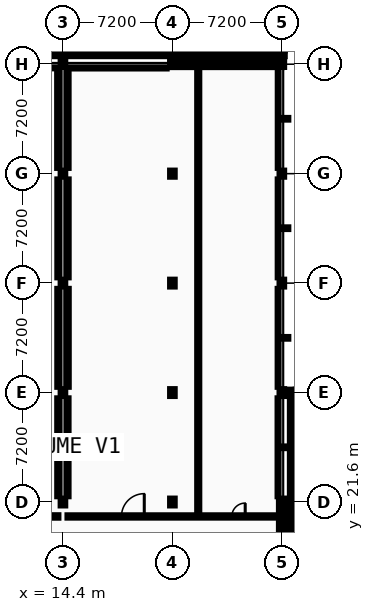
"""IFC4 building model, lengths in metres.
Left out: names, types, materials, properties, quantities, classifications, styles, units other than length and angle.
Written with IfcOpenShell. Run it as: python <this file> out.ifc"""

import sys

from ifc_helpers import new_model, si_unit, direction, frame, frame_2d, origin, origin_2d, place, context, subcontext, project, spatial, rectangle, i_section, extrude, element, fill, save


model = new_model("IFC4")
c1 = context("Model", 3, precision=1e-05, world=origin(), true_north=direction((0.0, 1.0)))
c2 = subcontext(c1, "Body", "Model", "MODEL_VIEW")
j1 = project(units=[si_unit("LENGTHUNIT", "METRE"), si_unit("PLANEANGLEUNIT", "RADIAN")], contexts=[c1])
p1 = place(None, origin())
s1 = spatial("IfcSite", under=j1, at=p1, CompositionType="ELEMENT")
p2 = place(p1, origin())
s2 = spatial("IfcBuilding", under=s1, at=p2, CompositionType="ELEMENT")
p3 = place(p2, frame((0.0, 0.0, 9.6)))
s3 = spatial("IfcBuildingStorey", under=s2, at=p3, CompositionType="ELEMENT", Elevation=9.6)
for number, where, z_axis, x_axis in (
    (1, (14.4, 21.6, 0.0), (0.0, 0.0, 1.0), (1.0, 0.0, 0.0)),
    (2, (14.4, 28.8, 0.0), (0.0, 0.0, 1.0), (1.0, 0.0, 0.0)),
    (3, (14.4, 36.0, 0.0), (0.0, 0.0, 1.0), (1.0, 0.0, 0.0)),
):
    element("IfcColumn", number, at=place(p3, frame(where, z_axis=z_axis, x_axis=x_axis)), inside=s3, PredefinedType="COLUMN", context=c2, shape_type="SweptSolid", body=[
        extrude(i_section(OverallWidth=0.3, OverallDepth=0.45, WebThickness=0.014, FlangeThickness=0.026, FilletRadius=0.027, at=origin_2d()), origin(), (0.0, 0.0, 1.0), 4.4),
    ])
p4 = place(p3, frame((14.4, 43.2, 0.0), z_axis=(0.0, 0.0, 1.0), x_axis=(1.0, 0.0, 0.0)))
e4 = element("IfcColumn", 4, at=p4, inside=s3, PredefinedType="COLUMN", context=c2, shape_type="SweptSolid", body=[
    extrude(i_section(OverallWidth=0.3, OverallDepth=0.4, WebThickness=0.013, FlangeThickness=0.024, FilletRadius=0.027, at=origin_2d()), origin(), (0.0, 0.0, 1.0), 4.4),
])
p5 = place(p3, frame((14.4, 50.4, 0.0), z_axis=(0.0, 0.0, 1.0), x_axis=(1.0, 0.0, 0.0)))
e5 = element("IfcColumn", 5, at=p5, inside=s3, PredefinedType="COLUMN", context=c2, shape_type="SweptSolid", body=[
    extrude(i_section(OverallWidth=0.3, OverallDepth=0.36, WebThickness=0.012, FlangeThickness=0.022, FilletRadius=0.027, at=origin_2d()), origin(), (0.0, 0.0, 1.0), 4.4),
])
p6 = place(p3, frame((14.4, 51.12, 0.0), z_axis=(0.0, 0.0, 1.0), x_axis=(1.0, 0.0, 0.0)))
e6 = element("IfcColumn", 6, at=p6, inside=s3, PredefinedType="COLUMN", context=c2, shape_type="SweptSolid", body=[
    extrude(i_section(OverallWidth=0.24, OverallDepth=0.24, WebThickness=0.01, FlangeThickness=0.017, FilletRadius=0.021, at=origin_2d()), origin(), (0.0, 0.0, 1.0), 4.4),
])
for number, where, z_axis, x_axis in (
    (7, (21.6, 21.6, 0.0), (0.0, 0.0, 1.0), (1.0, 0.0, 0.0)),
    (8, (21.6, 28.8, 0.0), (0.0, 0.0, 1.0), (1.0, 0.0, 0.0)),
    (9, (21.6, 36.0, 0.0), (0.0, 0.0, 1.0), (1.0, 0.0, 0.0)),
):
    element("IfcColumn", number, at=place(p3, frame(where, z_axis=z_axis, x_axis=x_axis)), inside=s3, PredefinedType="COLUMN", context=c2, shape_type="SweptSolid", body=[
        extrude(i_section(OverallWidth=0.3, OverallDepth=0.45, WebThickness=0.014, FlangeThickness=0.026, FilletRadius=0.027, at=origin_2d()), origin(), (0.0, 0.0, 1.0), 4.4),
    ])
p7 = place(p3, frame((21.6, 43.2, 0.0), z_axis=(0.0, 0.0, 1.0), x_axis=(1.0, 0.0, 0.0)))
e10 = element("IfcColumn", 10, at=p7, inside=s3, PredefinedType="COLUMN", context=c2, shape_type="SweptSolid", body=[
    extrude(i_section(OverallWidth=0.3, OverallDepth=0.4, WebThickness=0.013, FlangeThickness=0.024, FilletRadius=0.027, at=origin_2d()), origin(), (0.0, 0.0, 1.0), 4.4),
])
p8 = place(p3, frame((21.6, 50.4, 0.0), z_axis=(0.0, 0.0, 1.0), x_axis=(1.0, 0.0, 0.0)))
e11 = element("IfcColumn", 11, at=p8, inside=s3, PredefinedType="COLUMN", context=c2, shape_type="SweptSolid", body=[
    extrude(i_section(OverallWidth=0.3, OverallDepth=0.36, WebThickness=0.012, FlangeThickness=0.022, FilletRadius=0.027, at=origin_2d()), origin(), (0.0, 0.0, 1.0), 4.4),
])
p9 = place(p3, frame((21.6, 51.12, 0.0), z_axis=(0.0, 0.0, 1.0), x_axis=(1.0, 0.0, 0.0)))
e12 = element("IfcColumn", 12, at=p9, inside=s3, PredefinedType="COLUMN", context=c2, shape_type="SweptSolid", body=[
    extrude(i_section(OverallWidth=0.24, OverallDepth=0.24, WebThickness=0.01, FlangeThickness=0.017, FilletRadius=0.021, at=origin_2d()), origin(), (0.0, 0.0, 1.0), 4.4),
])
for number, where, z_axis, x_axis in (
    (13, (28.8, 21.6, 0.0), (0.0, 0.0, 1.0), (1.0, 0.0, 0.0)),
    (14, (28.8, 28.8, 0.0), (0.0, 0.0, 1.0), (1.0, 0.0, 0.0)),
    (15, (28.8, 36.0, 0.0), (0.0, 0.0, 1.0), (1.0, 0.0, 0.0)),
):
    element("IfcColumn", number, at=place(p3, frame(where, z_axis=z_axis, x_axis=x_axis)), inside=s3, PredefinedType="COLUMN", context=c2, shape_type="SweptSolid", body=[
        extrude(i_section(OverallWidth=0.3, OverallDepth=0.45, WebThickness=0.014, FlangeThickness=0.026, FilletRadius=0.027, at=origin_2d()), origin(), (0.0, 0.0, 1.0), 4.4),
    ])
p10 = place(p3, frame((28.8, 43.2, 0.0), z_axis=(0.0, 0.0, 1.0), x_axis=(1.0, 0.0, 0.0)))
e16 = element("IfcColumn", 16, at=p10, inside=s3, PredefinedType="COLUMN", context=c2, shape_type="SweptSolid", body=[
    extrude(i_section(OverallWidth=0.3, OverallDepth=0.4, WebThickness=0.013, FlangeThickness=0.024, FilletRadius=0.027, at=origin_2d()), origin(), (0.0, 0.0, 1.0), 4.4),
])
p11 = place(p3, frame((28.8, 50.4, 0.0), z_axis=(0.0, 0.0, 1.0), x_axis=(1.0, 0.0, 0.0)))
e17 = element("IfcColumn", 17, at=p11, inside=s3, PredefinedType="COLUMN", context=c2, shape_type="SweptSolid", body=[
    extrude(i_section(OverallWidth=0.3, OverallDepth=0.36, WebThickness=0.012, FlangeThickness=0.022, FilletRadius=0.027, at=origin_2d()), origin(), (0.0, 0.0, 1.0), 4.4),
])
p12 = place(p3, frame((28.8, 51.12, 0.0), z_axis=(0.0, 0.0, 1.0), x_axis=(1.0, 0.0, 0.0)))
e18 = element("IfcColumn", 18, at=p12, inside=s3, PredefinedType="COLUMN", context=c2, shape_type="SweptSolid", body=[
    extrude(i_section(OverallWidth=0.24, OverallDepth=0.24, WebThickness=0.01, FlangeThickness=0.017, FilletRadius=0.021, at=origin_2d()), origin(), (0.0, 0.0, 1.0), 4.4),
])
p13 = place(p3, frame((29.52, 21.6, 0.0), z_axis=(0.0, 0.0, 1.0), x_axis=(1.0, 0.0, 0.0)))
e19 = element("IfcColumn", 19, at=p13, inside=s3, PredefinedType="COLUMN", context=c2, shape_type="SweptSolid", body=[
    extrude(i_section(OverallWidth=0.3, OverallDepth=0.36, WebThickness=0.012, FlangeThickness=0.022, FilletRadius=0.027, at=origin_2d()), origin(), (0.0, 0.0, 1.0), 4.4),
])
p14 = place(p3, frame((29.52, 28.8, 0.0), z_axis=(0.0, 0.0, 1.0), x_axis=(1.0, 0.0, 0.0)))
e20 = element("IfcColumn", 20, at=p14, inside=s3, PredefinedType="COLUMN", context=c2, shape_type="SweptSolid", body=[
    extrude(i_section(OverallWidth=0.24, OverallDepth=0.24, WebThickness=0.01, FlangeThickness=0.017, FilletRadius=0.021, at=origin_2d()), origin(), (0.0, 0.0, 1.0), 4.4),
])
p15 = place(p3, frame((28.8, 50.4, 0.0), z_axis=(0.0, 0.0, 1.0), x_axis=(-1.0, 0.0, 0.0)))
e21 = element("IfcWall", 21, at=p15, inside=s3, PredefinedType="STANDARD", context=c2, shape_type="SweptSolid", body=[
    extrude(rectangle(XDim=7.31, YDim=0.38, at=frame_2d((3.655, 0.0))), origin(), (0.0, 0.0, 1.0), 3.895),
])
p16 = place(p15, frame((1.576, 0.0, 0.95)))
e22 = element("IfcOpeningElement", 22, at=p16, cuts=e21, PredefinedType="OPENING", context=c2, shape_type="SweptSolid", body=[
    extrude(rectangle(XDim=1.234, YDim=1.296, at=frame_2d((0.617, 0.648))), frame((0.0, 0.2, 0.0), z_axis=(0.0, -1.0, 0.0), x_axis=(1.0, 0.0, 0.0)), (0.0, 0.0, 1.0), 0.4),
])
p17 = place(p3, frame((28.8, 14.45, 0.0), z_axis=(0.0, 0.0, 1.0), x_axis=(0.0, 1.0, 0.0)))
e23 = element("IfcWall", 23, at=p17, inside=s3, PredefinedType="STANDARD", context=c2, shape_type="SweptSolid", body=[
    extrude(rectangle(XDim=7.15, YDim=0.38, at=frame_2d((3.575, 0.0))), origin(), (0.0, 0.0, 1.0), 4.2),
])
p18 = place(p17, frame((1.613, 0.0, 0.95)))
e24 = element("IfcOpeningElement", 24, at=p18, cuts=e23, PredefinedType="OPENING", context=c2, shape_type="SweptSolid", body=[
    extrude(rectangle(XDim=1.064, YDim=1.332, at=frame_2d((0.532, 0.666))), frame((0.0, 0.2, 0.0), z_axis=(0.0, -1.0, 0.0), x_axis=(1.0, 0.0, 0.0)), (0.0, 0.0, 1.0), 0.4),
])
p19 = place(p17, frame((4.473, 0.0, 0.95)))
e25 = element("IfcOpeningElement", 25, at=p19, cuts=e23, PredefinedType="OPENING", context=c2, shape_type="SweptSolid", body=[
    extrude(rectangle(XDim=1.064, YDim=1.332, at=frame_2d((0.532, 0.666))), frame((0.0, 0.2, 0.0), z_axis=(0.0, -1.0, 0.0), x_axis=(1.0, 0.0, 0.0)), (0.0, 0.0, 1.0), 0.4),
])
p20 = place(p3, frame((29.52, 21.6, 0.0), z_axis=(0.0, 0.0, 1.0), x_axis=(0.0, -1.0, 0.0)))
e26 = element("IfcWall", 26, at=p20, inside=s3, PredefinedType="STANDARD", context=c2, shape_type="SweptSolid", body=[
    extrude(rectangle(XDim=7.2, YDim=0.38, at=frame_2d((3.6, 0.0))), origin(), (0.0, 0.0, 1.0), 3.895),
])
p21 = place(p20, frame((1.662, 0.0, 0.95)))
e27 = element("IfcOpeningElement", 27, at=p21, cuts=e26, PredefinedType="OPENING", context=c2, shape_type="SweptSolid", body=[
    extrude(rectangle(XDim=0.996, YDim=1.368, at=frame_2d((0.498, 0.684))), frame((0.0, 0.2, 0.0), z_axis=(0.0, -1.0, 0.0), x_axis=(1.0, 0.0, 0.0)), (0.0, 0.0, 1.0), 0.4),
])
p22 = place(p20, frame((4.542, 0.0, 0.95)))
e28 = element("IfcOpeningElement", 28, at=p22, cuts=e26, PredefinedType="OPENING", context=c2, shape_type="SweptSolid", body=[
    extrude(rectangle(XDim=0.996, YDim=1.368, at=frame_2d((0.498, 0.684))), frame((0.0, 0.2, 0.0), z_axis=(0.0, -1.0, 0.0), x_axis=(1.0, 0.0, 0.0)), (0.0, 0.0, 1.0), 0.4),
])
p23 = place(p3, frame((29.52, 28.99, 0.0), z_axis=(0.0, 0.0, 1.0), x_axis=(0.0, -1.0, 0.0)))
e29 = element("IfcWall", 29, at=p23, inside=s3, PredefinedType="STANDARD", context=c2, shape_type="SweptSolid", body=[
    extrude(rectangle(XDim=7.39, YDim=0.38, at=frame_2d((3.695, 0.0))), origin(), (0.0, 0.0, 1.0), 3.9),
])
p24 = place(p23, frame((1.702, 0.0, 0.95)))
e30 = element("IfcOpeningElement", 30, at=p24, cuts=e29, PredefinedType="OPENING", context=c2, shape_type="SweptSolid", body=[
    extrude(rectangle(XDim=1.03, YDim=1.368, at=frame_2d((0.515, 0.684))), frame((0.0, 0.2, 0.0), z_axis=(0.0, -1.0, 0.0), x_axis=(1.0, 0.0, 0.0)), (0.0, 0.0, 1.0), 0.4),
])
p25 = place(p23, frame((4.658, 0.0, 0.95)))
e31 = element("IfcOpeningElement", 31, at=p25, cuts=e29, PredefinedType="OPENING", context=c2, shape_type="SweptSolid", body=[
    extrude(rectangle(XDim=1.03, YDim=1.368, at=frame_2d((0.515, 0.684))), frame((0.0, 0.2, 0.0), z_axis=(0.0, -1.0, 0.0), x_axis=(1.0, 0.0, 0.0)), (0.0, 0.0, 1.0), 0.4),
])
p26 = place(p3, frame((7.2, 51.12, 0.0), z_axis=(0.0, 0.0, 1.0), x_axis=(1.0, 0.0, 0.0)))
e32 = element("IfcWall", 32, at=p26, inside=s3, PredefinedType="STANDARD", context=c2, shape_type="SweptSolid", body=[
    extrude(rectangle(XDim=7.2, YDim=0.38, at=frame_2d((3.6, 0.0))), origin(), (0.0, 0.0, 1.0), 3.875),
])
p27 = place(p26, frame((4.474, 0.0, 0.95)))
e33 = element("IfcOpeningElement", 33, at=p27, cuts=e32, PredefinedType="OPENING", context=c2, shape_type="SweptSolid", body=[
    extrude(rectangle(XDim=1.132, YDim=1.26, at=frame_2d((0.566, 0.63))), frame((0.0, 0.2, 0.0), z_axis=(0.0, -1.0, 0.0), x_axis=(1.0, 0.0, 0.0)), (0.0, 0.0, 1.0), 0.4),
])
p28 = place(p3, frame((14.4, 51.12, 0.0), z_axis=(0.0, 0.0, 1.0), x_axis=(1.0, 0.0, 0.0)))
e34 = element("IfcWall", 34, at=p28, inside=s3, PredefinedType="STANDARD", context=c2, shape_type="SweptSolid", body=[
    extrude(rectangle(XDim=7.2, YDim=0.38, at=frame_2d((3.6, 0.0))), origin(), (0.0, 0.0, 1.0), 3.875),
])
p29 = place(p28, frame((1.577, 0.0, 0.95)))
e35 = element("IfcOpeningElement", 35, at=p29, cuts=e34, PredefinedType="OPENING", context=c2, shape_type="SweptSolid", body=[
    extrude(rectangle(XDim=1.166, YDim=1.26, at=frame_2d((0.583, 0.63))), frame((0.0, 0.2, 0.0), z_axis=(0.0, -1.0, 0.0), x_axis=(1.0, 0.0, 0.0)), (0.0, 0.0, 1.0), 0.4),
])
p30 = place(p3, frame((21.6, 51.12, 0.0), z_axis=(0.0, 0.0, 1.0), x_axis=(1.0, 0.0, 0.0)))
e36 = element("IfcWall", 36, at=p30, inside=s3, PredefinedType="STANDARD", context=c2, shape_type="SweptSolid", body=[
    extrude(rectangle(XDim=7.39, YDim=0.38, at=frame_2d((3.695, 0.0))), origin(), (0.0, 0.0, 1.0), 3.875),
])
p31 = place(p30, frame((1.617, 0.0, 0.95)))
e37 = element("IfcOpeningElement", 37, at=p31, cuts=e36, PredefinedType="OPENING", context=c2, shape_type="SweptSolid", body=[
    extrude(rectangle(XDim=1.2, YDim=1.26, at=frame_2d((0.6, 0.63))), frame((0.0, 0.2, 0.0), z_axis=(0.0, -1.0, 0.0), x_axis=(1.0, 0.0, 0.0)), (0.0, 0.0, 1.0), 0.4),
])
p32 = place(p30, frame((4.573, 0.0, 0.95)))
e38 = element("IfcOpeningElement", 38, at=p32, cuts=e36, PredefinedType="OPENING", context=c2, shape_type="SweptSolid", body=[
    extrude(rectangle(XDim=1.2, YDim=1.26, at=frame_2d((0.6, 0.63))), frame((0.0, 0.2, 0.0), z_axis=(0.0, -1.0, 0.0), x_axis=(1.0, 0.0, 0.0)), (0.0, 0.0, 1.0), 0.4),
])
p33 = place(p3, frame((0.2, 20.65, 0.0), z_axis=(0.0, 0.0, 1.0), x_axis=(1.0, 0.0, 0.0)))
e39 = element("IfcWall", 39, at=p33, inside=s3, PredefinedType="PARTITIONING", context=c2, shape_type="SweptSolid", body=[
    extrude(rectangle(XDim=13.9, YDim=0.16, at=frame_2d((6.95, 0.0))), origin(), (0.0, 0.0, 1.0), 4.2),
])
p34 = place(p33, frame((2.025, 0.0, 0.0)))
e40 = element("IfcOpeningElement", 40, at=p34, cuts=e39, PredefinedType="OPENING", context=c2, shape_type="SweptSolid", body=[
    extrude(rectangle(XDim=1.5, YDim=2.2, at=frame_2d((0.75, 1.1))), frame((0.0, 0.09, 0.0), z_axis=(0.0, -1.0, 0.0), x_axis=(1.0, 0.0, 0.0)), (0.0, 0.0, 1.0), 0.18),
])
p35 = place(p33, frame((9.272, 0.0, 0.0)))
e41 = element("IfcOpeningElement", 41, at=p35, cuts=e39, PredefinedType="OPENING", context=c2, shape_type="SweptSolid", body=[
    extrude(rectangle(XDim=0.906, YDim=2.152, at=frame_2d((0.453, 1.076))), frame((0.0, 0.09, 0.0), z_axis=(0.0, -1.0, 0.0), x_axis=(1.0, 0.0, 0.0)), (0.0, 0.0, 1.0), 0.18),
])
p36 = place(p3, frame((14.7, 20.65, 0.0), z_axis=(0.0, 0.0, 1.0), x_axis=(1.0, 0.0, 0.0)))
e42 = element("IfcWall", 42, at=p36, inside=s3, PredefinedType="PARTITIONING", context=c2, shape_type="SweptSolid", body=[
    extrude(rectangle(XDim=13.9, YDim=0.15, at=frame_2d((6.95, 0.0))), origin(), (0.0, 0.0, 1.0), 4.2),
])
p37 = place(p36, frame((10.81, 0.0, 0.0)))
e43 = element("IfcOpeningElement", 43, at=p37, cuts=e42, PredefinedType="OPENING", context=c2, shape_type="SweptSolid", body=[
    extrude(rectangle(XDim=0.88, YDim=2.152, at=frame_2d((0.44, 1.076))), frame((0.0, 0.085, 0.0), z_axis=(0.0, -1.0, 0.0), x_axis=(1.0, 0.0, 0.0)), (0.0, 0.0, 1.0), 0.17),
])
p38 = place(p36, frame((3.55, 0.0, 0.0)))
e44 = element("IfcOpeningElement", 44, at=p38, cuts=e42, PredefinedType="OPENING", context=c2, shape_type="SweptSolid", body=[
    extrude(rectangle(XDim=1.5, YDim=2.2, at=frame_2d((0.75, 1.1))), frame((0.0, 0.085, 0.0), z_axis=(0.0, -1.0, 0.0), x_axis=(1.0, 0.0, 0.0)), (0.0, 0.0, 1.0), 0.17),
])
p39 = place(p3, frame((7.58, 50.2, 0.0), z_axis=(0.0, 0.0, 1.0), x_axis=(1.0, 0.0, 0.0)))
e45 = element("IfcWall", 45, at=p39, inside=s3, PredefinedType="PARTITIONING", context=c2, shape_type="SweptSolid", body=[
    extrude(rectangle(XDim=6.44, YDim=0.142, at=frame_2d((3.22, 0.0))), origin(), (0.0, 0.0, 1.0), 3.895),
])
p40 = place(p3, frame((14.78, 50.2, 0.0), z_axis=(0.0, 0.0, 1.0), x_axis=(1.0, 0.0, 0.0)))
e46 = element("IfcWall", 46, at=p40, inside=s3, PredefinedType="PARTITIONING", context=c2, shape_type="SweptSolid", body=[
    extrude(rectangle(XDim=6.44, YDim=0.16, at=frame_2d((3.22, 0.0))), origin(), (0.0, 0.0, 1.0), 3.895),
])
p41 = place(p3, frame((14.1, 21.98, 0.0), z_axis=(0.0, 0.0, 1.0), x_axis=(0.0, 1.0, 0.0)))
e47 = element("IfcWall", 47, at=p41, inside=s3, PredefinedType="PARTITIONING", context=c2, shape_type="SweptSolid", body=[
    extrude(rectangle(XDim=6.44, YDim=0.15, at=frame_2d((3.22, 0.0))), origin(), (0.0, 0.0, 1.0), 3.895),
])
p42 = place(p3, frame((14.1, 29.18, 0.0), z_axis=(0.0, 0.0, 1.0), x_axis=(0.0, 1.0, 0.0)))
e48 = element("IfcWall", 48, at=p42, inside=s3, PredefinedType="PARTITIONING", context=c2, shape_type="SweptSolid", body=[
    extrude(rectangle(XDim=6.44, YDim=0.142, at=frame_2d((3.22, 0.0))), origin(), (0.0, 0.0, 1.0), 3.895),
])
p43 = place(p3, frame((14.1, 36.38, 0.0), z_axis=(0.0, 0.0, 1.0), x_axis=(0.0, 1.0, 0.0)))
e49 = element("IfcWall", 49, at=p43, inside=s3, PredefinedType="PARTITIONING", context=c2, shape_type="SweptSolid", body=[
    extrude(rectangle(XDim=6.44, YDim=0.135, at=frame_2d((3.22, 0.0))), origin(), (0.0, 0.0, 1.0), 4.2),
])
p44 = place(p3, frame((14.1, 43.58, 0.0), z_axis=(0.0, 0.0, 1.0), x_axis=(0.0, 1.0, 0.0)))
e50 = element("IfcWall", 50, at=p44, inside=s3, PredefinedType="PARTITIONING", context=c2, shape_type="SweptSolid", body=[
    extrude(rectangle(XDim=6.44, YDim=0.16, at=frame_2d((3.22, 0.0))), origin(), (0.0, 0.0, 1.0), 3.895),
])
p45 = place(p3, frame((14.7, 21.98, 0.0), z_axis=(0.0, 0.0, 1.0), x_axis=(0.0, 1.0, 0.0)))
e51 = element("IfcWall", 51, at=p45, inside=s3, PredefinedType="PARTITIONING", context=c2, shape_type="SweptSolid", body=[
    extrude(rectangle(XDim=6.44, YDim=0.135, at=frame_2d((3.22, 0.0))), origin(), (0.0, 0.0, 1.0), 4.2),
])
p46 = place(p3, frame((14.7, 29.18, 0.0), z_axis=(0.0, 0.0, 1.0), x_axis=(0.0, 1.0, 0.0)))
e52 = element("IfcWall", 52, at=p46, inside=s3, PredefinedType="PARTITIONING", context=c2, shape_type="SweptSolid", body=[
    extrude(rectangle(XDim=6.44, YDim=0.16, at=frame_2d((3.22, 0.0))), origin(), (0.0, 0.0, 1.0), 3.895),
])
p47 = place(p3, frame((14.7, 36.38, 0.0), z_axis=(0.0, 0.0, 1.0), x_axis=(0.0, 1.0, 0.0)))
e53 = element("IfcWall", 53, at=p47, inside=s3, PredefinedType="PARTITIONING", context=c2, shape_type="SweptSolid", body=[
    extrude(rectangle(XDim=6.44, YDim=0.15, at=frame_2d((3.22, 0.0))), origin(), (0.0, 0.0, 1.0), 3.895),
])
p48 = place(p3, frame((14.7, 43.58, 0.0), z_axis=(0.0, 0.0, 1.0), x_axis=(0.0, 1.0, 0.0)))
e54 = element("IfcWall", 54, at=p48, inside=s3, PredefinedType="PARTITIONING", context=c2, shape_type="SweptSolid", body=[
    extrude(rectangle(XDim=6.44, YDim=0.142, at=frame_2d((3.22, 0.0))), origin(), (0.0, 0.0, 1.0), 3.895),
])
p49 = place(p3, frame((23.3, 20.725, 0.0), z_axis=(0.0, 0.0, 1.0), x_axis=(0.0, 1.0, 0.0)))
e55 = element("IfcWall", 55, at=p49, inside=s3, PredefinedType="PARTITIONING", context=c2, shape_type="SweptSolid", body=[
    extrude(rectangle(XDim=29.475, YDim=0.135, at=frame_2d((14.737, 0.0))), origin(), (0.0, 0.0, 1.0), 4.2),
])
p50 = place(p3, frame((28.6, 21.98, 0.0), z_axis=(0.0, 0.0, 1.0), x_axis=(0.0, 1.0, 0.0)))
e56 = element("IfcWall", 56, at=p50, inside=s3, PredefinedType="PARTITIONING", context=c2, shape_type="SweptSolid", body=[
    extrude(rectangle(XDim=6.44, YDim=0.16, at=frame_2d((3.22, 0.0))), origin(), (0.0, 0.0, 1.0), 3.895),
])
p51 = place(p3, frame((28.6, 29.18, 0.0), z_axis=(0.0, 0.0, 1.0), x_axis=(0.0, 1.0, 0.0)))
e57 = element("IfcWall", 57, at=p51, inside=s3, PredefinedType="PARTITIONING", context=c2, shape_type="SweptSolid", body=[
    extrude(rectangle(XDim=6.44, YDim=0.15, at=frame_2d((3.22, 0.0))), origin(), (0.0, 0.0, 1.0), 3.885),
])
p52 = place(p3, frame((28.6, 36.38, 0.0), z_axis=(0.0, 0.0, 1.0), x_axis=(0.0, 1.0, 0.0)))
e58 = element("IfcWall", 58, at=p52, inside=s3, PredefinedType="PARTITIONING", context=c2, shape_type="SweptSolid", body=[
    extrude(rectangle(XDim=6.44, YDim=0.142, at=frame_2d((3.22, 0.0))), origin(), (0.0, 0.0, 1.0), 3.885),
])
p53 = place(p3, frame((28.6, 43.58, 0.0), z_axis=(0.0, 0.0, 1.0), x_axis=(0.0, 1.0, 0.0)))
e59 = element("IfcWall", 59, at=p53, inside=s3, PredefinedType="PARTITIONING", context=c2, shape_type="SweptSolid", body=[
    extrude(rectangle(XDim=6.44, YDim=0.135, at=frame_2d((3.22, 0.0))), origin(), (0.0, 0.0, 1.0), 3.885),
])
p54 = place(p16, origin())
e60 = element("IfcWindow", 60, at=p54, inside=s3, PartitioningType="SINGLE_PANEL", PredefinedType="WINDOW", context=c2, shape_type="SweptSolid", body=[
    extrude(rectangle(XDim=1.234, YDim=1.296, at=frame_2d((0.617, 0.648))), frame((0.0, 0.03, 0.0), z_axis=(0.0, -1.0, 0.0), x_axis=(1.0, 0.0, 0.0)), (0.0, 0.0, 1.0), 0.06),
])
fill(e22, e60)
p55 = place(p19, origin())
e61 = element("IfcWindow", 61, at=p55, inside=s3, PartitioningType="SINGLE_PANEL", PredefinedType="WINDOW", context=c2, shape_type="SweptSolid", body=[
    extrude(rectangle(XDim=1.064, YDim=1.332, at=frame_2d((0.532, 0.666))), frame((0.0, 0.03, 0.0), z_axis=(0.0, -1.0, 0.0), x_axis=(1.0, 0.0, 0.0)), (0.0, 0.0, 1.0), 0.06),
])
fill(e25, e61)
p56 = place(p21, origin())
e62 = element("IfcWindow", 62, at=p56, inside=s3, PartitioningType="SINGLE_PANEL", PredefinedType="WINDOW", context=c2, shape_type="SweptSolid", body=[
    extrude(rectangle(XDim=0.996, YDim=1.368, at=frame_2d((0.498, 0.684))), frame((0.0, 0.03, 0.0), z_axis=(0.0, -1.0, 0.0), x_axis=(1.0, 0.0, 0.0)), (0.0, 0.0, 1.0), 0.06),
])
fill(e27, e62)
p57 = place(p24, origin())
e63 = element("IfcWindow", 63, at=p57, inside=s3, PartitioningType="SINGLE_PANEL", PredefinedType="WINDOW", context=c2, shape_type="SweptSolid", body=[
    extrude(rectangle(XDim=1.03, YDim=1.368, at=frame_2d((0.515, 0.684))), frame((0.0, 0.03, 0.0), z_axis=(0.0, -1.0, 0.0), x_axis=(1.0, 0.0, 0.0)), (0.0, 0.0, 1.0), 0.06),
])
fill(e30, e63)
p58 = place(p25, origin())
e64 = element("IfcWindow", 64, at=p58, inside=s3, PartitioningType="SINGLE_PANEL", PredefinedType="WINDOW", context=c2, shape_type="SweptSolid", body=[
    extrude(rectangle(XDim=1.03, YDim=1.368, at=frame_2d((0.515, 0.684))), frame((0.0, 0.03, 0.0), z_axis=(0.0, -1.0, 0.0), x_axis=(1.0, 0.0, 0.0)), (0.0, 0.0, 1.0), 0.06),
])
fill(e31, e64)
p59 = place(p29, origin())
e65 = element("IfcWindow", 65, at=p59, inside=s3, PartitioningType="SINGLE_PANEL", PredefinedType="WINDOW", context=c2, shape_type="SweptSolid", body=[
    extrude(rectangle(XDim=1.166, YDim=1.26, at=frame_2d((0.583, 0.63))), frame((0.0, 0.03, 0.0), z_axis=(0.0, -1.0, 0.0), x_axis=(1.0, 0.0, 0.0)), (0.0, 0.0, 1.0), 0.06),
])
fill(e35, e65)
p60 = place(p31, origin())
e66 = element("IfcWindow", 66, at=p60, inside=s3, PartitioningType="SINGLE_PANEL", PredefinedType="WINDOW", context=c2, shape_type="SweptSolid", body=[
    extrude(rectangle(XDim=1.2, YDim=1.26, at=frame_2d((0.6, 0.63))), frame((0.0, 0.03, 0.0), z_axis=(0.0, -1.0, 0.0), x_axis=(1.0, 0.0, 0.0)), (0.0, 0.0, 1.0), 0.06),
])
fill(e37, e66)
p61 = place(p32, origin())
e67 = element("IfcWindow", 67, at=p61, inside=s3, PartitioningType="SINGLE_PANEL", PredefinedType="WINDOW", context=c2, shape_type="SweptSolid", body=[
    extrude(rectangle(XDim=1.2, YDim=1.26, at=frame_2d((0.6, 0.63))), frame((0.0, 0.03, 0.0), z_axis=(0.0, -1.0, 0.0), x_axis=(1.0, 0.0, 0.0)), (0.0, 0.0, 1.0), 0.06),
])
fill(e38, e67)
p62 = place(p37, frame((0.88, 0.0, 0.0), z_axis=(0.0, 0.0, 1.0), x_axis=(-1.0, 0.0, 0.0)))
e68 = element("IfcDoor", 68, at=p62, inside=s3, OperationType="SINGLE_SWING_RIGHT", PredefinedType="DOOR", context=c2, shape_type="SweptSolid", body=[
    extrude(rectangle(XDim=0.88, YDim=2.152, at=frame_2d((0.44, 1.076))), frame((0.0, 0.025, 0.0), z_axis=(0.0, -1.0, 0.0), x_axis=(1.0, 0.0, 0.0)), (0.0, 0.0, 1.0), 0.05),
])
fill(e43, e68)
p63 = place(p38, frame((1.5, 0.0, 0.0), z_axis=(0.0, 0.0, 1.0), x_axis=(-1.0, 0.0, 0.0)))
e69 = element("IfcDoor", 69, at=p63, inside=s3, OperationType="DOUBLE_DOOR_SINGLE_SWING", PredefinedType="DOOR", context=c2, shape_type="SweptSolid", body=[
    extrude(rectangle(XDim=1.5, YDim=2.2, at=frame_2d((0.75, 1.1))), frame((0.0, 0.025, 0.0), z_axis=(0.0, -1.0, 0.0), x_axis=(1.0, 0.0, 0.0)), (0.0, 0.0, 1.0), 0.05),
])
fill(e44, e69)
save(model, sys.argv[1])
